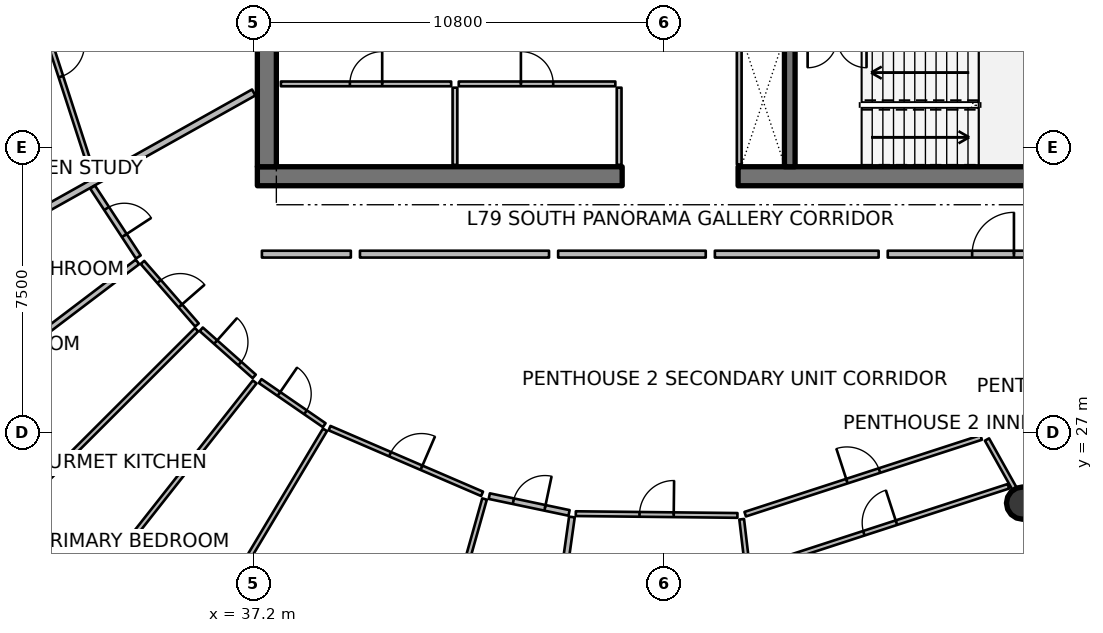
"""IFC4 building model, lengths in metres.
Left out: names, types, materials, properties, quantities, classifications, styles, units other than length and angle.
Written with IfcOpenShell. Run it as: python <this file> out.ifc"""

import sys

from ifc_helpers import new_model, si_unit, direction, frame, frame_2d, origin, origin_2d, place, context, subcontext, project, spatial, rectangle, circle, extrude, element, fill, save


model = new_model("IFC4")
c1 = context("Model", 3, precision=1e-05, world=origin(), true_north=direction((0.0, 1.0)))
c2 = subcontext(c1, "Body", "Model", "MODEL_VIEW")
j1 = project(units=[si_unit("LENGTHUNIT", "METRE"), si_unit("PLANEANGLEUNIT", "RADIAN")], contexts=[c1])
p1 = place(None, origin())
s1 = spatial("IfcSite", under=j1, at=p1, CompositionType="ELEMENT")
p2 = place(p1, origin())
s2 = spatial("IfcBuilding", under=s1, at=p2, CompositionType="ELEMENT")
p3 = place(p2, frame((0.0, 0.0, 313.7)))
s3 = spatial("IfcBuildingStorey", under=s2, at=p3, CompositionType="ELEMENT", Elevation=313.7)
p4 = place(p3, frame((37.3, 33.75, 0.0), z_axis=(0.0, 0.0, 1.0), x_axis=(1.0, 0.0, 0.0)))
e1 = element("IfcWall", 1, at=p4, inside=s3, PredefinedType="SHEAR", context=c2, shape_type="SweptSolid", body=[
    extrude(rectangle(XDim=9.6, YDim=0.5, at=frame_2d((4.8, 0.0))), origin(), (0.0, 0.0, 1.0), 4.2),
])
p5 = place(p3, frame((49.95, 33.75, 0.0), z_axis=(0.0, 0.0, 1.0), x_axis=(1.0, 0.0, 0.0)))
e2 = element("IfcWall", 2, at=p5, inside=s3, PredefinedType="SHEAR", context=c2, shape_type="SweptSolid", body=[
    extrude(rectangle(XDim=9.6, YDim=0.5, at=frame_2d((4.8, 0.0))), origin(), (0.0, 0.0, 1.0), 4.2),
])
p6 = place(p3, frame((37.55, 34.0, 0.0), z_axis=(0.0, 0.0, 1.0), x_axis=(0.0, 1.0, 0.0)))
e3 = element("IfcWall", 3, at=p6, inside=s3, PredefinedType="SHEAR", context=c2, shape_type="SweptSolid", body=[
    extrude(rectangle(XDim=16.0, YDim=0.5, at=frame_2d((8.0, 0.0))), origin(), (0.0, 0.0, 1.0), 4.2),
])
p7 = place(p3, frame((51.31, 34.0, 0.0), z_axis=(0.0, 0.0, 1.0), x_axis=(0.0, 1.0, 0.0)))
e4 = element("IfcWall", 4, at=p7, inside=s3, PredefinedType="SHEAR", context=c2, shape_type="SweptSolid", body=[
    extrude(rectangle(XDim=3.5, YDim=0.28, at=frame_2d((1.75, 0.0))), origin(), (0.0, 0.0, 1.0), 4.2),
])
for number, where, z_axis, x_axis in (
    (5, (33.684, 23.841, 0.0), (0.0, 0.0, 1.0), (1.0, 0.0, 0.0)),
    (6, (57.437, 25.149, 0.0), (0.0, 0.0, 1.0), (1.0, 0.0, 0.0)),
):
    element("IfcColumn", number, at=place(p3, frame(where, z_axis=z_axis, x_axis=x_axis)), inside=s3, PredefinedType="COLUMN", context=c2, shape_type="SweptSolid", body=[
        extrude(circle(Radius=0.425, at=origin_2d()), origin(), (0.0, 0.0, 1.0), 3.94),
    ])
for number, where, z_axis, x_axis in (
    (7, (46.82, 34.05, 0.0), (0.0, 0.0, 1.0), (0.0, 1.0, 0.0)),
    (8, (42.5, 34.05, 0.0), (0.0, 0.0, 1.0), (0.0, 1.0, 0.0)),
):
    element("IfcWall", number, at=place(p3, frame(where, z_axis=z_axis, x_axis=x_axis)), inside=s3, PredefinedType="PARTITIONING", context=c2, shape_type="SweptSolid", body=[
        extrude(rectangle(XDim=2.03, YDim=0.125, at=frame_2d((1.015, 0.0))), origin(), (0.0, 0.0, 1.0), 3.38),
    ])
p8 = place(p3, frame((37.92, 36.18, 0.0), z_axis=(0.0, 0.0, 1.0), x_axis=(1.0, 0.0, 0.0)))
e9 = element("IfcWall", 9, at=p8, inside=s3, PredefinedType="PARTITIONING", context=c2, shape_type="SweptSolid", body=[
    extrude(rectangle(XDim=4.48, YDim=0.125, at=frame_2d((2.24, 0.0))), origin(), (0.0, 0.0, 1.0), 3.38),
])
p9 = place(p8, frame((1.815, 0.0, 0.0)))
e10 = element("IfcOpeningElement", 10, at=p9, cuts=e9, PredefinedType="OPENING", context=c2, shape_type="SweptSolid", body=[
    extrude(rectangle(XDim=0.85, YDim=2.06, at=frame_2d((0.425, 1.03))), frame((0.0, 0.073, 0.0), z_axis=(0.0, -1.0, 0.0), x_axis=(1.0, 0.0, 0.0)), (0.0, 0.0, 1.0), 0.145),
])
p10 = place(p3, frame((42.6, 36.18, 0.0), z_axis=(0.0, 0.0, 1.0), x_axis=(1.0, 0.0, 0.0)))
e11 = element("IfcWall", 11, at=p10, inside=s3, PredefinedType="PARTITIONING", context=c2, shape_type="SweptSolid", body=[
    extrude(rectangle(XDim=4.12, YDim=0.125, at=frame_2d((2.06, 0.0))), origin(), (0.0, 0.0, 1.0), 3.38),
])
p11 = place(p10, frame((1.635, 0.0, 0.0)))
e12 = element("IfcOpeningElement", 12, at=p11, cuts=e11, PredefinedType="OPENING", context=c2, shape_type="SweptSolid", body=[
    extrude(rectangle(XDim=0.85, YDim=2.06, at=frame_2d((0.425, 1.03))), frame((0.0, 0.073, 0.0), z_axis=(0.0, -1.0, 0.0), x_axis=(1.0, 0.0, 0.0)), (0.0, 0.0, 1.0), 0.145),
])
p12 = place(p3, frame((49.98, 34.06, 0.0), z_axis=(0.0, 0.0, 1.0), x_axis=(0.0, 1.0, 0.0)))
e13 = element("IfcWall", 13, at=p12, inside=s3, PredefinedType="PARTITIONING", context=c2, shape_type="SweptSolid", body=[
    extrude(rectangle(XDim=3.4, YDim=0.125, at=frame_2d((1.7, 0.0))), origin(), (0.0, 0.0, 1.0), 3.38),
])
p13 = place(p3, frame((37.204, 35.954, 0.0), z_axis=(0.0, 0.0, 1.0), x_axis=(-0.872495191914, -0.488622697064, 0.0)))
e14 = element("IfcWall", 14, at=p13, inside=s3, PredefinedType="PARTITIONING", context=c2, shape_type="SweptSolid", body=[
    extrude(rectangle(XDim=13.462, YDim=0.18, at=frame_2d((6.731, 0.0))), origin(), (0.0, 0.0, 1.0), 3.38),
])
p14 = place(p3, frame((30.99, 39.878, 0.0), z_axis=(0.0, 0.0, 1.0), x_axis=(0.309026406972, -0.951053457905, 0.0)))
e15 = element("IfcWall", 15, at=p14, inside=s3, PredefinedType="PARTITIONING", context=c2, shape_type="SweptSolid", body=[
    extrude(rectangle(XDim=6.477, YDim=0.125, at=frame_2d((3.238, 0.0))), origin(), (0.0, 0.0, 1.0), 3.38),
])
p15 = place(p14, frame((2.788, 0.0, 0.0)))
e16 = element("IfcOpeningElement", 16, at=p15, cuts=e15, PredefinedType="OPENING", context=c2, shape_type="SweptSolid", body=[
    extrude(rectangle(XDim=0.9, YDim=2.08, at=frame_2d((0.45, 1.04))), frame((0.0, 0.073, 0.0), z_axis=(0.0, -1.0, 0.0), x_axis=(1.0, 0.0, 0.0)), (0.0, 0.0, 1.0), 0.145),
])
p16 = place(p3, frame((53.888, 31.7, 0.0), z_axis=(0.0, 0.0, 1.0), x_axis=(1.0, 0.0, 0.0)))
e17 = element("IfcWall", 17, at=p16, inside=s3, PredefinedType="PARTITIONING", context=c2, shape_type="SweptSolid", body=[
    extrude(rectangle(XDim=5.542, YDim=0.18, at=frame_2d((2.771, 0.0))), origin(), (0.0, 0.0, 1.0), 3.38),
])
p17 = place(p16, frame((2.221, 0.0, 0.0)))
e18 = element("IfcOpeningElement", 18, at=p17, cuts=e17, PredefinedType="OPENING", context=c2, shape_type="SweptSolid", body=[
    extrude(rectangle(XDim=1.1, YDim=2.1, at=frame_2d((0.55, 1.05))), frame((0.0, 0.1, 0.0), z_axis=(0.0, -1.0, 0.0), x_axis=(1.0, 0.0, 0.0)), (0.0, 0.0, 1.0), 0.2),
])
p18 = place(p3, frame((37.42, 31.7, 0.0), z_axis=(0.0, 0.0, 1.0), x_axis=(1.0, 0.0, 0.0)))
e19 = element("IfcWall", 19, at=p18, inside=s3, PredefinedType="PARTITIONING", context=c2, shape_type="SweptSolid", body=[
    extrude(rectangle(XDim=2.34, YDim=0.18, at=frame_2d((1.17, 0.0))), origin(), (0.0, 0.0, 1.0), 3.38),
])
p19 = place(p3, frame((32.964, 33.465, 0.0), z_axis=(0.0, 0.0, 1.0), x_axis=(0.547736904717, -0.836650633903, 0.0)))
e20 = element("IfcWall", 20, at=p19, inside=s3, PredefinedType="PARTITIONING", context=c2, shape_type="SweptSolid", body=[
    extrude(rectangle(XDim=2.199, YDim=0.15, at=frame_2d((1.099, 0.0))), origin(), (0.0, 0.0, 1.0), 3.38),
])
p20 = place(p19, frame((0.674, 0.0, 0.0)))
e21 = element("IfcOpeningElement", 21, at=p20, cuts=e20, PredefinedType="OPENING", context=c2, shape_type="SweptSolid", body=[
    extrude(rectangle(XDim=0.85, YDim=2.06, at=frame_2d((0.425, 1.03))), frame((0.0, 0.085, 0.0), z_axis=(0.0, -1.0, 0.0), x_axis=(1.0, 0.0, 0.0)), (0.0, 0.0, 1.0), 0.17),
])
p21 = place(p3, frame((34.146, 31.496, 0.0), z_axis=(0.0, 0.0, 1.0), x_axis=(-0.796862333182, -0.60416092389, 0.0)))
e22 = element("IfcWall", 22, at=p21, inside=s3, PredefinedType="PARTITIONING", context=c2, shape_type="SweptSolid", body=[
    extrude(rectangle(XDim=3.72, YDim=0.15, at=frame_2d((1.86, 0.0))), origin(), (0.0, 0.0, 1.0), 3.38),
])
p22 = place(p3, frame((35.7, 29.713, 0.0), z_axis=(0.0, 0.0, 1.0), x_axis=(-0.707470011435, -0.706743364256, 0.0)))
e23 = element("IfcWall", 23, at=p22, inside=s3, PredefinedType="PARTITIONING", context=c2, shape_type="SweptSolid", body=[
    extrude(rectangle(XDim=7.728, YDim=0.125, at=frame_2d((3.864, 0.0))), origin(), (0.0, 0.0, 1.0), 3.38),
])
p23 = place(p3, frame((34.277, 31.482, 0.0), z_axis=(0.0, 0.0, 1.0), x_axis=(0.656959210167, -0.753926121167, 0.0)))
e24 = element("IfcWall", 24, at=p23, inside=s3, PredefinedType="PARTITIONING", context=c2, shape_type="SweptSolid", body=[
    extrude(rectangle(XDim=2.183, YDim=0.125, at=frame_2d((1.091, 0.0))), origin(), (0.0, 0.0, 1.0), 3.38),
])
p24 = place(p23, frame((0.667, 0.0, 0.0)))
e25 = element("IfcOpeningElement", 25, at=p24, cuts=e24, PredefinedType="OPENING", context=c2, shape_type="SweptSolid", body=[
    extrude(rectangle(XDim=0.85, YDim=2.06, at=frame_2d((0.425, 1.03))), frame((0.0, 0.073, 0.0), z_axis=(0.0, -1.0, 0.0), x_axis=(1.0, 0.0, 0.0)), (0.0, 0.0, 1.0), 0.145),
])
p25 = place(p3, frame((35.823, 29.723, 0.0), z_axis=(0.0, 0.0, 1.0), x_axis=(0.747438201164, -0.664331344617, 0.0)))
e26 = element("IfcWall", 26, at=p25, inside=s3, PredefinedType="PARTITIONING", context=c2, shape_type="SweptSolid", body=[
    extrude(rectangle(XDim=1.865, YDim=0.125, at=frame_2d((0.933, 0.0))), origin(), (0.0, 0.0, 1.0), 3.38),
])
p26 = place(p25, frame((0.508, 0.0, 0.0)))
e27 = element("IfcOpeningElement", 27, at=p26, cuts=e26, PredefinedType="OPENING", context=c2, shape_type="SweptSolid", body=[
    extrude(rectangle(XDim=0.85, YDim=2.06, at=frame_2d((0.425, 1.03))), frame((0.0, 0.073, 0.0), z_axis=(0.0, -1.0, 0.0), x_axis=(1.0, 0.0, 0.0)), (0.0, 0.0, 1.0), 0.145),
])
p27 = place(p3, frame((40.0, 31.7, 0.0), z_axis=(0.0, 0.0, 1.0), x_axis=(1.0, 0.0, 0.0)))
e28 = element("IfcWall", 28, at=p27, inside=s3, PredefinedType="PARTITIONING", context=c2, shape_type="SweptSolid", body=[
    extrude(rectangle(XDim=4.975, YDim=0.18, at=frame_2d((2.488, 0.0))), origin(), (0.0, 0.0, 1.0), 3.38),
])
p28 = place(p3, frame((37.23, 28.339, 0.0), z_axis=(0.0, 0.0, 1.0), x_axis=(-0.619087123863, -0.785322311581, 0.0)))
e29 = element("IfcWall", 29, at=p28, inside=s3, PredefinedType="PARTITIONING", context=c2, shape_type="SweptSolid", body=[
    extrude(rectangle(XDim=7.731, YDim=0.125, at=frame_2d((3.865, 0.0))), origin(), (0.0, 0.0, 1.0), 3.38),
])
p29 = place(p3, frame((39.079, 27.077, 0.0), z_axis=(0.0, 0.0, 1.0), x_axis=(-0.513092804865, -0.858333136723, 0.0)))
e30 = element("IfcWall", 30, at=p29, inside=s3, PredefinedType="PARTITIONING", context=c2, shape_type="SweptSolid", body=[
    extrude(rectangle(XDim=6.58, YDim=0.125, at=frame_2d((3.29, 0.0))), origin(), (0.0, 0.0, 1.0), 3.38),
])
p30 = place(p3, frame((37.375, 28.361, 0.0), z_axis=(0.0, 0.0, 1.0), x_axis=(0.823529894266, -0.567272873712, 0.0)))
e31 = element("IfcWall", 31, at=p30, inside=s3, PredefinedType="PARTITIONING", context=c2, shape_type="SweptSolid", body=[
    extrude(rectangle(XDim=2.046, YDim=0.125, at=frame_2d((1.023, 0.0))), origin(), (0.0, 0.0, 1.0), 3.38),
])
p31 = place(p30, frame((0.598, 0.0, 0.0)))
e32 = element("IfcOpeningElement", 32, at=p31, cuts=e31, PredefinedType="OPENING", context=c2, shape_type="SweptSolid", body=[
    extrude(rectangle(XDim=0.85, YDim=2.06, at=frame_2d((0.425, 1.03))), frame((0.0, 0.073, 0.0), z_axis=(0.0, -1.0, 0.0), x_axis=(1.0, 0.0, 0.0)), (0.0, 0.0, 1.0), 0.145),
])
p32 = place(p3, frame((39.199, 27.123, 0.0), z_axis=(0.0, 0.0, 1.0), x_axis=(0.918386386282, -0.395684780466, 0.0)))
e33 = element("IfcWall", 33, at=p32, inside=s3, PredefinedType="PARTITIONING", context=c2, shape_type="SweptSolid", body=[
    extrude(rectangle(XDim=4.371, YDim=0.125, at=frame_2d((2.186, 0.0))), origin(), (0.0, 0.0, 1.0), 3.38),
])
p33 = place(p32, frame((1.736, 0.0, 0.0)))
e34 = element("IfcOpeningElement", 34, at=p33, cuts=e33, PredefinedType="OPENING", context=c2, shape_type="SweptSolid", body=[
    extrude(rectangle(XDim=0.9, YDim=2.08, at=frame_2d((0.45, 1.04))), frame((0.0, 0.073, 0.0), z_axis=(0.0, -1.0, 0.0), x_axis=(1.0, 0.0, 0.0)), (0.0, 0.0, 1.0), 0.145),
])
p34 = place(p3, frame((45.215, 31.7, 0.0), z_axis=(0.0, 0.0, 1.0), x_axis=(1.0, 0.0, 0.0)))
e35 = element("IfcWall", 35, at=p34, inside=s3, PredefinedType="PARTITIONING", context=c2, shape_type="SweptSolid", body=[
    extrude(rectangle(XDim=3.884, YDim=0.18, at=frame_2d((1.942, 0.0))), origin(), (0.0, 0.0, 1.0), 3.38),
])
p35 = place(p3, frame((43.278, 25.257, 0.0), z_axis=(0.0, 0.0, 1.0), x_axis=(-0.271452912573, -0.962451721519, 0.0)))
e36 = element("IfcWall", 36, at=p35, inside=s3, PredefinedType="PARTITIONING", context=c2, shape_type="SweptSolid", body=[
    extrude(rectangle(XDim=5.597, YDim=0.125, at=frame_2d((2.798, 0.0))), origin(), (0.0, 0.0, 1.0), 3.38),
])
p36 = place(p3, frame((43.403, 25.333, 0.0), z_axis=(0.0, 0.0, 1.0), x_axis=(0.978565484163, -0.205935895864, 0.0)))
e37 = element("IfcWall", 37, at=p36, inside=s3, PredefinedType="PARTITIONING", context=c2, shape_type="SweptSolid", body=[
    extrude(rectangle(XDim=2.145, YDim=0.15, at=frame_2d((1.072, 0.0))), origin(), (0.0, 0.0, 1.0), 3.38),
])
p37 = place(p36, frame((0.647, 0.0, 0.0)))
e38 = element("IfcOpeningElement", 38, at=p37, cuts=e37, PredefinedType="OPENING", context=c2, shape_type="SweptSolid", body=[
    extrude(rectangle(XDim=0.85, YDim=2.06, at=frame_2d((0.425, 1.03))), frame((0.0, 0.085, 0.0), z_axis=(0.0, -1.0, 0.0), x_axis=(1.0, 0.0, 0.0)), (0.0, 0.0, 1.0), 0.17),
])
p38 = place(p3, frame((45.577, 24.784, 0.0), z_axis=(0.0, 0.0, 1.0), x_axis=(-0.139343441712, -0.99024411397, 0.0)))
e39 = element("IfcWall", 39, at=p38, inside=s3, PredefinedType="PARTITIONING", context=c2, shape_type="SweptSolid", body=[
    extrude(rectangle(XDim=4.475, YDim=0.15, at=frame_2d((2.237, 0.0))), origin(), (0.0, 0.0, 1.0), 3.38),
])
p39 = place(p3, frame((45.68, 24.872, 0.0), z_axis=(0.0, 0.0, 1.0), x_axis=(0.99993989629, -0.010963749724, 0.0)))
e40 = element("IfcWall", 40, at=p39, inside=s3, PredefinedType="PARTITIONING", context=c2, shape_type="SweptSolid", body=[
    extrude(rectangle(XDim=4.253, YDim=0.125, at=frame_2d((2.126, 0.0))), origin(), (0.0, 0.0, 1.0), 3.38),
])
p40 = place(p39, frame((1.677, 0.0, 0.0)))
e41 = element("IfcOpeningElement", 41, at=p40, cuts=e40, PredefinedType="OPENING", context=c2, shape_type="SweptSolid", body=[
    extrude(rectangle(XDim=0.9, YDim=2.08, at=frame_2d((0.45, 1.04))), frame((0.0, 0.073, 0.0), z_axis=(0.0, -1.0, 0.0), x_axis=(1.0, 0.0, 0.0)), (0.0, 0.0, 1.0), 0.145),
])
p41 = place(p3, frame((49.339, 31.7, 0.0), z_axis=(0.0, 0.0, 1.0), x_axis=(1.0, 0.0, 0.0)))
e42 = element("IfcWall", 42, at=p41, inside=s3, PredefinedType="PARTITIONING", context=c2, shape_type="SweptSolid", body=[
    extrude(rectangle(XDim=4.309, YDim=0.18, at=frame_2d((2.155, 0.0))), origin(), (0.0, 0.0, 1.0), 3.38),
])
p42 = place(p3, frame((50.045, 24.725, 0.0), z_axis=(0.0, 0.0, 1.0), x_axis=(0.117544267504, -0.993067643807, 0.0)))
e43 = element("IfcWall", 43, at=p42, inside=s3, PredefinedType="PARTITIONING", context=c2, shape_type="SweptSolid", body=[
    extrude(rectangle(XDim=3.566, YDim=0.125, at=frame_2d((1.783, 0.0))), origin(), (0.0, 0.0, 1.0), 3.38),
])
p43 = place(p3, frame((56.5, 26.822, 0.0), z_axis=(0.0, 0.0, 1.0), x_axis=(0.488645059518, -0.872482667913, 0.0)))
e44 = element("IfcWall", 44, at=p43, inside=s3, PredefinedType="PARTITIONING", context=c2, shape_type="SweptSolid", body=[
    extrude(rectangle(XDim=3.566, YDim=0.125, at=frame_2d((1.783, 0.0))), origin(), (0.0, 0.0, 1.0), 3.38),
])
p44 = place(p3, frame((50.137, 24.858, 0.0), z_axis=(0.0, 0.0, 1.0), x_axis=(0.95106401822, 0.30899390487, 0.0)))
e45 = element("IfcWall", 45, at=p44, inside=s3, PredefinedType="PARTITIONING", context=c2, shape_type="SweptSolid", body=[
    extrude(rectangle(XDim=6.529, YDim=0.125, at=frame_2d((3.264, 0.0))), origin(), (0.0, 0.0, 1.0), 3.38),
])
p45 = place(p44, frame((2.814, 0.0, 0.0)))
e46 = element("IfcOpeningElement", 46, at=p45, cuts=e45, PredefinedType="OPENING", context=c2, shape_type="SweptSolid", body=[
    extrude(rectangle(XDim=0.9, YDim=2.08, at=frame_2d((0.45, 1.04))), frame((0.0, 0.073, 0.0), z_axis=(0.0, -1.0, 0.0), x_axis=(1.0, 0.0, 0.0)), (0.0, 0.0, 1.0), 0.145),
])
p46 = place(p3, frame((50.31, 23.398, 0.0), z_axis=(0.0, 0.0, 1.0), x_axis=(0.951062105288, 0.308999792693, 0.0)))
e47 = element("IfcWall", 47, at=p46, inside=s3, PredefinedType="PARTITIONING", context=c2, shape_type="SweptSolid", body=[
    extrude(rectangle(XDim=7.102, YDim=0.125, at=frame_2d((3.551, 0.0))), origin(), (0.0, 0.0, 1.0), 3.38),
])
p47 = place(p46, frame((3.101, 0.0, 0.0)))
e48 = element("IfcOpeningElement", 48, at=p47, cuts=e47, PredefinedType="OPENING", context=c2, shape_type="SweptSolid", body=[
    extrude(rectangle(XDim=0.9, YDim=2.08, at=frame_2d((0.45, 1.04))), frame((0.0, 0.073, 0.0), z_axis=(0.0, -1.0, 0.0), x_axis=(1.0, 0.0, 0.0)), (0.0, 0.0, 1.0), 0.145),
])
p48 = place(p9, origin())
e49 = element("IfcDoor", 49, at=p48, inside=s3, OperationType="SINGLE_SWING_RIGHT", PredefinedType="DOOR", context=c2, shape_type="SweptSolid", body=[
    extrude(rectangle(XDim=0.85, YDim=2.06, at=frame_2d((0.425, 1.03))), frame((0.0, 0.025, 0.0), z_axis=(0.0, -1.0, 0.0), x_axis=(1.0, 0.0, 0.0)), (0.0, 0.0, 1.0), 0.05),
])
fill(e10, e49)
p49 = place(p11, origin())
e50 = element("IfcDoor", 50, at=p49, inside=s3, OperationType="SINGLE_SWING_LEFT", PredefinedType="DOOR", context=c2, shape_type="SweptSolid", body=[
    extrude(rectangle(XDim=0.85, YDim=2.06, at=frame_2d((0.425, 1.03))), frame((0.0, 0.025, 0.0), z_axis=(0.0, -1.0, 0.0), x_axis=(1.0, 0.0, 0.0)), (0.0, 0.0, 1.0), 0.05),
])
fill(e12, e50)
p50 = place(p15, origin())
e51 = element("IfcDoor", 51, at=p50, inside=s3, OperationType="SINGLE_SWING_LEFT", PredefinedType="DOOR", context=c2, shape_type="SweptSolid", body=[
    extrude(rectangle(XDim=0.9, YDim=2.08, at=frame_2d((0.45, 1.04))), frame((0.0, 0.025, 0.0), z_axis=(0.0, -1.0, 0.0), x_axis=(1.0, 0.0, 0.0)), (0.0, 0.0, 1.0), 0.05),
])
fill(e16, e51)
p51 = place(p17, origin())
e52 = element("IfcDoor", 52, at=p51, inside=s3, OperationType="SINGLE_SWING_RIGHT", PredefinedType="DOOR", context=c2, shape_type="SweptSolid", body=[
    extrude(rectangle(XDim=1.1, YDim=2.1, at=frame_2d((0.55, 1.05))), frame((0.0, 0.025, 0.0), z_axis=(0.0, -1.0, 0.0), x_axis=(1.0, 0.0, 0.0)), (0.0, 0.0, 1.0), 0.05),
])
fill(e18, e52)
p52 = place(p20, origin())
e53 = element("IfcDoor", 53, at=p52, inside=s3, OperationType="SINGLE_SWING_RIGHT", PredefinedType="DOOR", context=c2, shape_type="SweptSolid", body=[
    extrude(rectangle(XDim=0.85, YDim=2.06, at=frame_2d((0.425, 1.03))), frame((0.0, 0.025, 0.0), z_axis=(0.0, -1.0, 0.0), x_axis=(1.0, 0.0, 0.0)), (0.0, 0.0, 1.0), 0.05),
])
fill(e21, e53)
p53 = place(p24, origin())
e54 = element("IfcDoor", 54, at=p53, inside=s3, OperationType="SINGLE_SWING_RIGHT", PredefinedType="DOOR", context=c2, shape_type="SweptSolid", body=[
    extrude(rectangle(XDim=0.85, YDim=2.06, at=frame_2d((0.425, 1.03))), frame((0.0, 0.025, 0.0), z_axis=(0.0, -1.0, 0.0), x_axis=(1.0, 0.0, 0.0)), (0.0, 0.0, 1.0), 0.05),
])
fill(e25, e54)
p54 = place(p26, origin())
e55 = element("IfcDoor", 55, at=p54, inside=s3, OperationType="SINGLE_SWING_LEFT", PredefinedType="DOOR", context=c2, shape_type="SweptSolid", body=[
    extrude(rectangle(XDim=0.85, YDim=2.06, at=frame_2d((0.425, 1.03))), frame((0.0, 0.025, 0.0), z_axis=(0.0, -1.0, 0.0), x_axis=(1.0, 0.0, 0.0)), (0.0, 0.0, 1.0), 0.05),
])
fill(e27, e55)
p55 = place(p31, origin())
e56 = element("IfcDoor", 56, at=p55, inside=s3, OperationType="SINGLE_SWING_LEFT", PredefinedType="DOOR", context=c2, shape_type="SweptSolid", body=[
    extrude(rectangle(XDim=0.85, YDim=2.06, at=frame_2d((0.425, 1.03))), frame((0.0, 0.025, 0.0), z_axis=(0.0, -1.0, 0.0), x_axis=(1.0, 0.0, 0.0)), (0.0, 0.0, 1.0), 0.05),
])
fill(e32, e56)
p56 = place(p33, origin())
e57 = element("IfcDoor", 57, at=p56, inside=s3, OperationType="SINGLE_SWING_RIGHT", PredefinedType="DOOR", context=c2, shape_type="SweptSolid", body=[
    extrude(rectangle(XDim=0.9, YDim=2.08, at=frame_2d((0.45, 1.04))), frame((0.0, 0.025, 0.0), z_axis=(0.0, -1.0, 0.0), x_axis=(1.0, 0.0, 0.0)), (0.0, 0.0, 1.0), 0.05),
])
fill(e34, e57)
p57 = place(p37, origin())
e58 = element("IfcDoor", 58, at=p57, inside=s3, OperationType="SINGLE_SWING_RIGHT", PredefinedType="DOOR", context=c2, shape_type="SweptSolid", body=[
    extrude(rectangle(XDim=0.85, YDim=2.06, at=frame_2d((0.425, 1.03))), frame((0.0, 0.025, 0.0), z_axis=(0.0, -1.0, 0.0), x_axis=(1.0, 0.0, 0.0)), (0.0, 0.0, 1.0), 0.05),
])
fill(e38, e58)
p58 = place(p40, origin())
e59 = element("IfcDoor", 59, at=p58, inside=s3, OperationType="SINGLE_SWING_RIGHT", PredefinedType="DOOR", context=c2, shape_type="SweptSolid", body=[
    extrude(rectangle(XDim=0.9, YDim=2.08, at=frame_2d((0.45, 1.04))), frame((0.0, 0.025, 0.0), z_axis=(0.0, -1.0, 0.0), x_axis=(1.0, 0.0, 0.0)), (0.0, 0.0, 1.0), 0.05),
])
fill(e41, e59)
p59 = place(p45, origin())
e60 = element("IfcDoor", 60, at=p59, inside=s3, OperationType="SINGLE_SWING_LEFT", PredefinedType="DOOR", context=c2, shape_type="SweptSolid", body=[
    extrude(rectangle(XDim=0.9, YDim=2.08, at=frame_2d((0.45, 1.04))), frame((0.0, 0.025, 0.0), z_axis=(0.0, -1.0, 0.0), x_axis=(1.0, 0.0, 0.0)), (0.0, 0.0, 1.0), 0.05),
])
fill(e46, e60)
p60 = place(p47, origin())
e61 = element("IfcDoor", 61, at=p60, inside=s3, OperationType="SINGLE_SWING_RIGHT", PredefinedType="DOOR", context=c2, shape_type="SweptSolid", body=[
    extrude(rectangle(XDim=0.9, YDim=2.08, at=frame_2d((0.45, 1.04))), frame((0.0, 0.025, 0.0), z_axis=(0.0, -1.0, 0.0), x_axis=(1.0, 0.0, 0.0)), (0.0, 0.0, 1.0), 0.05),
])
fill(e48, e61)
save(model, sys.argv[1])
